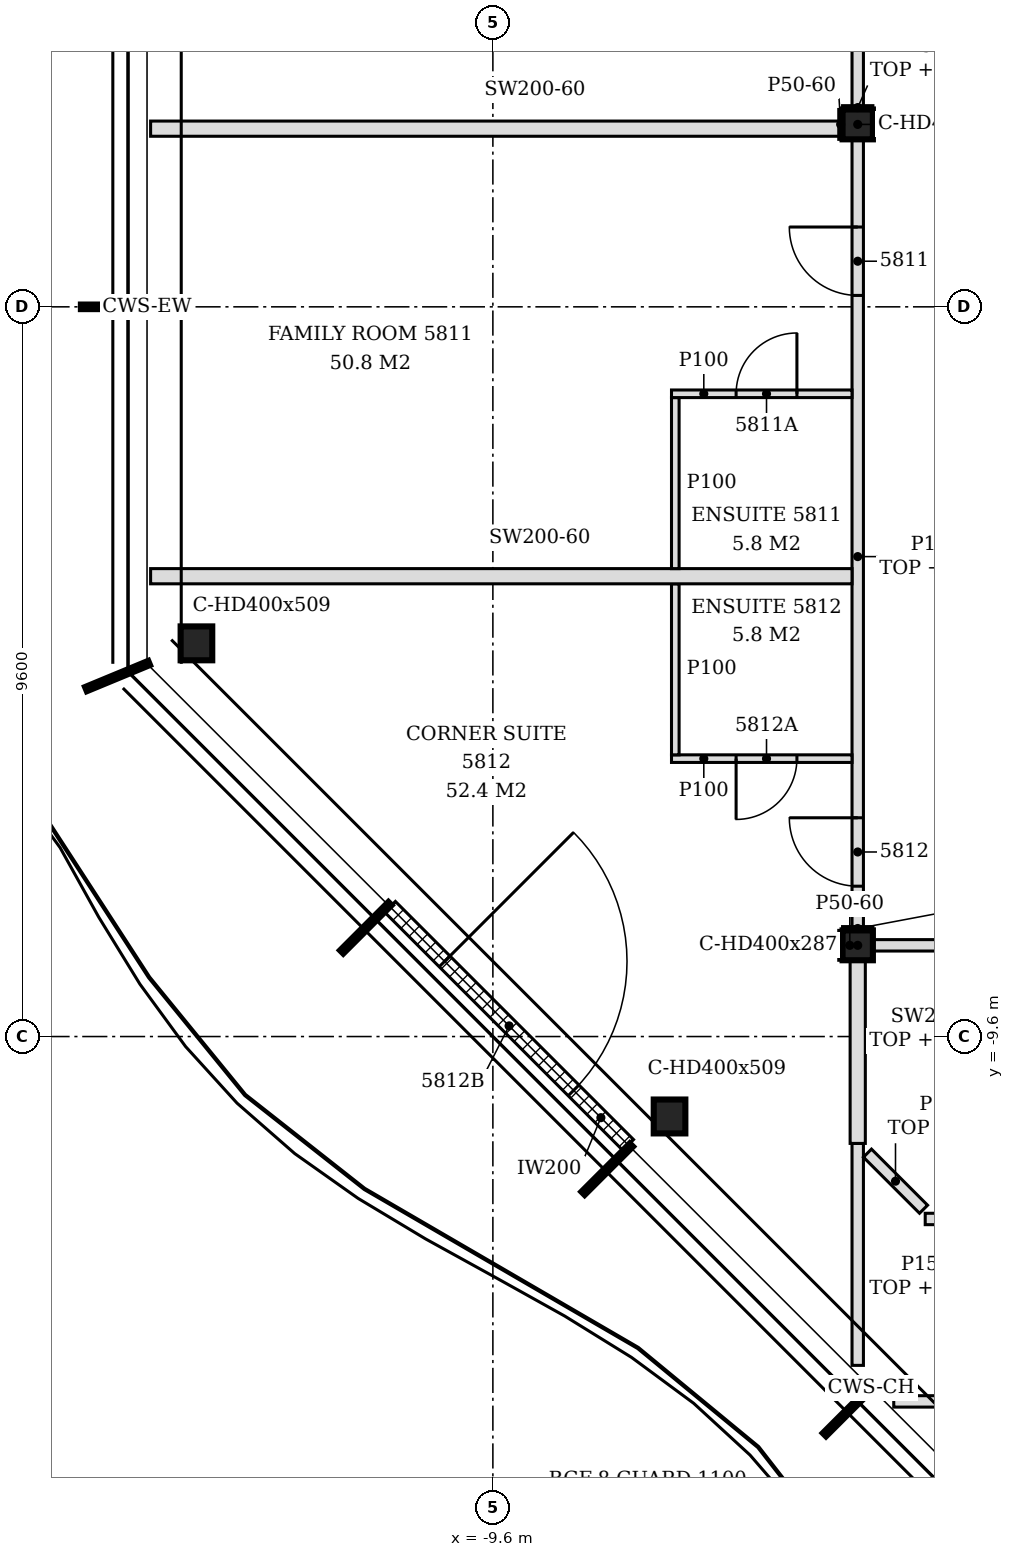
"""IFC4 building model, lengths in metres.
Left out: names, types, materials, properties, quantities, classifications, styles, units other than length and angle.
Written with IfcOpenShell. Run it as: python <this file> out.ifc"""

import sys

from ifc_helpers import new_model, si_unit, direction, frame, frame_2d, origin, origin_2d, place, context, subcontext, project, spatial, polyline, rectangle, i_section, outline, extrude, element, fill, save


model = new_model("IFC4")
c1 = context("Model", 3, precision=1e-05, world=origin(), true_north=direction((0.0, 1.0)))
c2 = subcontext(c1, "Body", "Model", "MODEL_VIEW")
j1 = project(units=[si_unit("LENGTHUNIT", "METRE"), si_unit("PLANEANGLEUNIT", "RADIAN")], contexts=[c1])
p1 = place(None, origin())
s1 = spatial("IfcSite", under=j1, at=p1, CompositionType="ELEMENT")
p2 = place(p1, origin())
s2 = spatial("IfcBuilding", under=s1, at=p2, CompositionType="ELEMENT")
p3 = place(p2, frame((0.0, 0.0, 228.6)))
s3 = spatial("IfcBuildingStorey", under=s2, at=p3, CompositionType="ELEMENT", Elevation=228.6)
for number, where, z_axis, x_axis in (
    (1, (-13.5, -4.427, -0.15), (0.0, 0.0, 1.0), (1.0, 0.0, 0.0)),
    (2, (-7.276, -10.652, -0.15), (0.0, 0.0, 1.0), (1.0, 0.0, 0.0)),
):
    element("IfcColumn", number, at=place(p3, frame(where, z_axis=z_axis, x_axis=x_axis)), inside=s3, PredefinedType="COLUMN", context=c2, shape_type="SweptSolid", body=[
        extrude(i_section(OverallWidth=0.416, OverallDepth=0.446, WebThickness=0.039, FlangeThickness=0.063, FilletRadius=0.015, at=origin_2d()), origin(), (0.0, 0.0, 1.0), 3.6),
    ])
for number, where, z_axis, x_axis in (
    (3, (-4.8, -8.4, -0.15), (0.0, 0.0, 1.0), (1.0, 0.0, 0.0)),
    (4, (-4.8, 2.4, -0.15), (0.0, 0.0, 1.0), (1.0, 0.0, 0.0)),
):
    element("IfcColumn", number, at=place(p3, frame(where, z_axis=z_axis, x_axis=x_axis)), inside=s3, PredefinedType="COLUMN", context=c2, shape_type="SweptSolid", body=[
        extrude(i_section(OverallWidth=0.399, OverallDepth=0.393, WebThickness=0.023, FlangeThickness=0.037, FilletRadius=0.015, at=origin_2d()), origin(), (0.0, 0.0, 1.0), 3.6),
    ])
p4 = place(p3, frame((-10.953, -7.893, 0.0), z_axis=(0.0, 0.0, 1.0), x_axis=(0.707106781187, -0.707106781187, 0.0)))
e5 = element("IfcWall", 5, at=p4, inside=s3, PredefinedType="NOTDEFINED", context=c2, shape_type="SweptSolid", body=[
    extrude(rectangle(XDim=4.431, YDim=0.2, at=frame_2d((2.215, 0.0))), origin(), (0.0, 0.0, 1.0), 3.45),
])
p5 = place(p4, frame((1.015, 0.0, 0.0)))
e6 = element("IfcOpeningElement", 6, at=p5, cuts=e5, PredefinedType="OPENING", context=c2, shape_type="SweptSolid", body=[
    extrude(rectangle(XDim=2.4, YDim=2.4, at=frame_2d((1.2, 1.2))), frame((0.0, 0.11, 0.0), z_axis=(0.0, -1.0, 0.0), x_axis=(1.0, 0.0, 0.0)), (0.0, 0.0, 1.0), 0.22),
])
p6 = place(p3, frame((-4.326, -14.4, 0.0), z_axis=(0.0, 0.0, 1.0), x_axis=(1.0, 0.0, 0.0)))
e7 = element("IfcWall", 7, at=p6, inside=s3, PredefinedType="PARTITIONING", context=c2, shape_type="SweptSolid", body=[
    extrude(outline(polyline([(0.0, 0.0), (21.026, 0.0), (21.026, 2.88), (11.676, 2.88), (11.674, 2.73), (11.376, 2.73), (11.374, 2.88), (1.369, 2.88), (1.367, 2.63), (0.229, 2.63), (0.227, 2.88), (0.0, 2.88), (0.0, 0.0)])), frame((0.0, 0.075, 0.0), z_axis=(0.0, -1.0, 0.0), x_axis=(1.0, 0.0, 0.0)), (0.0, 0.0, 1.0), 0.15),
])
p7 = place(p6, frame((5.169, 0.0, 0.0)))
e8 = element("IfcOpeningElement", 8, at=p7, cuts=e7, PredefinedType="OPENING", context=c2, shape_type="SweptSolid", body=[
    extrude(rectangle(XDim=0.9, YDim=2.1, at=frame_2d((0.45, 1.05))), frame((0.0, 0.085, 0.0), z_axis=(0.0, -1.0, 0.0), x_axis=(1.0, 0.0, 0.0)), (0.0, 0.0, 1.0), 0.17),
])
p8 = place(p6, frame((15.969, 0.0, 0.0)))
e9 = element("IfcOpeningElement", 9, at=p8, cuts=e7, PredefinedType="OPENING", context=c2, shape_type="SweptSolid", body=[
    extrude(rectangle(XDim=0.9, YDim=2.1, at=frame_2d((0.45, 1.05))), frame((0.0, 0.085, 0.0), z_axis=(0.0, -1.0, 0.0), x_axis=(1.0, 0.0, 0.0)), (0.0, 0.0, 1.0), 0.17),
])
p9 = place(p3, frame((-4.8, -13.926, 0.0), z_axis=(0.0, 0.0, 1.0), x_axis=(0.0, 1.0, 0.0)))
e10 = element("IfcWall", 10, at=p9, inside=s3, PredefinedType="PARTITIONING", context=c2, shape_type="SweptSolid", body=[
    extrude(outline(polyline([(0.0, 0.0), (2.92, 0.0), (2.92, 3.03), (1.369, 3.03), (1.367, 2.63), (0.229, 2.63), (0.227, 3.03), (0.0, 3.03), (0.0, 0.0)])), frame((0.0, 0.075, 0.0), z_axis=(0.0, -1.0, 0.0), x_axis=(1.0, 0.0, 0.0)), (0.0, 0.0, 1.0), 0.15),
])
p10 = place(p3, frame((-3.912, -12.0, 0.0), z_axis=(0.0, 0.0, 1.0), x_axis=(1.0, 0.0, 0.0)))
e11 = element("IfcWall", 11, at=p10, inside=s3, PredefinedType="PARTITIONING", context=c2, shape_type="SweptSolid", body=[
    extrude(rectangle(XDim=8.787, YDim=0.15, at=frame_2d((4.394, 0.0))), origin(), (0.0, 0.0, 1.0), 3.45),
])
p11 = place(p3, frame((-3.934, -11.872, 0.0), z_axis=(0.0, 0.0, 1.0), x_axis=(-0.707106781187, 0.707106781187, 0.0)))
e12 = element("IfcWall", 12, at=p11, inside=s3, PredefinedType="PARTITIONING", context=c2, shape_type="SweptSolid", body=[
    extrude(rectangle(XDim=1.044, YDim=0.15, at=frame_2d((0.522, 0.0))), origin(), (0.0, 0.0, 1.0), 3.03),
])
p12 = place(p3, frame((-4.8, -11.006, 0.0), z_axis=(0.0, 0.0, 1.0), x_axis=(0.0, 1.0, 0.0)))
e13 = element("IfcWall", 13, at=p12, inside=s3, PredefinedType="PARTITIONING", context=c2, shape_type="SweptSolid", body=[
    extrude(rectangle(XDim=2.41, YDim=0.2, at=frame_2d((1.205, 0.0))), origin(), (0.0, 0.0, 1.0), 3.03),
])
p13 = place(p3, frame((-4.601, -8.4, 0.0), z_axis=(0.0, 0.0, 1.0), x_axis=(1.0, 0.0, 0.0)))
e14 = element("IfcWall", 14, at=p13, inside=s3, PredefinedType="PARTITIONING", context=c2, shape_type="SweptSolid", body=[
    extrude(rectangle(XDim=9.476, YDim=0.15, at=frame_2d((4.738, 0.0))), origin(), (0.0, 0.0, 1.0), 2.83),
])
p14 = place(p13, frame((4.15, 0.0, 0.0)))
e15 = element("IfcOpeningElement", 15, at=p14, cuts=e14, PredefinedType="OPENING", context=c2, shape_type="SweptSolid", body=[
    extrude(rectangle(XDim=0.9, YDim=2.1, at=frame_2d((0.45, 1.05))), frame((0.0, 0.085, 0.0), z_axis=(0.0, -1.0, 0.0), x_axis=(1.0, 0.0, 0.0)), (0.0, 0.0, 1.0), 0.17),
])
p15 = place(p3, frame((-4.8, -8.204, 0.0), z_axis=(0.0, 0.0, 1.0), x_axis=(0.0, 1.0, 0.0)))
e16 = element("IfcWall", 16, at=p15, inside=s3, PredefinedType="PARTITIONING", context=c2, shape_type="SweptSolid", body=[
    extrude(rectangle(XDim=10.407, YDim=0.15, at=frame_2d((5.204, 0.0))), origin(), (0.0, 0.0, 1.0), 2.83),
])
p16 = place(p15, frame((8.354, 0.0, 0.0)))
e17 = element("IfcOpeningElement", 17, at=p16, cuts=e16, PredefinedType="OPENING", context=c2, shape_type="SweptSolid", body=[
    extrude(rectangle(XDim=0.9, YDim=2.1, at=frame_2d((0.45, 1.05))), frame((0.0, 0.085, 0.0), z_axis=(0.0, -1.0, 0.0), x_axis=(1.0, 0.0, 0.0)), (0.0, 0.0, 1.0), 0.17),
])
p17 = place(p15, frame((0.582, 0.0, 0.0)))
e18 = element("IfcOpeningElement", 18, at=p17, cuts=e16, PredefinedType="OPENING", context=c2, shape_type="SweptSolid", body=[
    extrude(rectangle(XDim=0.9, YDim=2.1, at=frame_2d((0.45, 1.05))), frame((0.0, 0.085, 0.0), z_axis=(0.0, -1.0, 0.0), x_axis=(1.0, 0.0, 0.0)), (0.0, 0.0, 1.0), 0.17),
])
p18 = place(p3, frame((-7.25, -5.944, 0.0), z_axis=(0.0, 0.0, 1.0), x_axis=(1.0, 0.0, 0.0)))
e19 = element("IfcWall", 19, at=p18, inside=s3, PredefinedType="PARTITIONING", context=c2, shape_type="SweptSolid", body=[
    extrude(outline(polyline([(0.0, 0.0), (2.375, 0.0), (2.375, 2.83), (2.3, 2.83), (2.298, 3.45), (0.0, 3.45), (0.0, 0.0)])), frame((0.0, 0.05, 0.0), z_axis=(0.0, -1.0, 0.0), x_axis=(1.0, 0.0, 0.0)), (0.0, 0.0, 1.0), 0.1),
])
p19 = place(p18, frame((0.85, 0.0, 0.0)))
e20 = element("IfcOpeningElement", 20, at=p19, cuts=e19, PredefinedType="OPENING", context=c2, shape_type="SweptSolid", body=[
    extrude(rectangle(XDim=0.8, YDim=2.1, at=frame_2d((0.4, 1.05))), frame((0.0, 0.06, 0.0), z_axis=(0.0, -1.0, 0.0), x_axis=(1.0, 0.0, 0.0)), (0.0, 0.0, 1.0), 0.12),
])
p20 = place(p3, frame((-7.2, -5.894, 0.0), z_axis=(0.0, 0.0, 1.0), x_axis=(0.0, 1.0, 0.0)))
e21 = element("IfcWall", 21, at=p20, inside=s3, PredefinedType="PARTITIONING", context=c2, shape_type="SweptSolid", body=[
    extrude(outline(polyline([(0.0, 0.0), (2.25, 0.0), (2.25, 3.45), (1.189, 3.45), (1.187, 2.98), (0.999, 2.98), (0.997, 3.45), (0.0, 3.45), (0.0, 0.0)])), frame((0.0, 0.05, 0.0), z_axis=(0.0, -1.0, 0.0), x_axis=(1.0, 0.0, 0.0)), (0.0, 0.0, 1.0), 0.1),
])
p21 = place(p3, frame((-14.103, -3.544, 0.0), z_axis=(0.0, 0.0, 1.0), x_axis=(1.0, 0.0, 0.0)))
e22 = element("IfcWall", 22, at=p21, inside=s3, PredefinedType="PARTITIONING", context=c2, shape_type="SweptSolid", body=[
    extrude(outline(polyline([(0.0, 0.0), (9.228, 0.0), (9.228, 2.83), (9.153, 2.83), (9.151, 3.45), (0.753, 3.45), (0.751, 2.93), (0.453, 2.93), (0.451, 3.45), (0.0, 3.45), (0.0, 0.0)])), frame((0.0, 0.1, 0.0), z_axis=(0.0, -1.0, 0.0), x_axis=(1.0, 0.0, 0.0)), (0.0, 0.0, 1.0), 0.2),
])
p22 = place(p3, frame((-7.2, -3.444, 0.0), z_axis=(0.0, 0.0, 1.0), x_axis=(0.0, 1.0, 0.0)))
e23 = element("IfcWall", 23, at=p22, inside=s3, PredefinedType="PARTITIONING", context=c2, shape_type="SweptSolid", body=[
    extrude(rectangle(XDim=2.25, YDim=0.1, at=frame_2d((1.125, 0.0))), origin(), (0.0, 0.0, 1.0), 3.45),
])
p23 = place(p3, frame((-7.25, -1.144, 0.0), z_axis=(0.0, 0.0, 1.0), x_axis=(1.0, 0.0, 0.0)))
e24 = element("IfcWall", 24, at=p23, inside=s3, PredefinedType="PARTITIONING", context=c2, shape_type="SweptSolid", body=[
    extrude(outline(polyline([(0.0, 0.0), (2.375, 0.0), (2.375, 2.83), (2.3, 2.83), (2.298, 3.45), (0.0, 3.45), (0.0, 0.0)])), frame((0.0, 0.05, 0.0), z_axis=(0.0, -1.0, 0.0), x_axis=(1.0, 0.0, 0.0)), (0.0, 0.0, 1.0), 0.1),
])
p24 = place(p23, frame((0.85, 0.0, 0.0)))
e25 = element("IfcOpeningElement", 25, at=p24, cuts=e24, PredefinedType="OPENING", context=c2, shape_type="SweptSolid", body=[
    extrude(rectangle(XDim=0.8, YDim=2.1, at=frame_2d((0.4, 1.05))), frame((0.0, 0.06, 0.0), z_axis=(0.0, -1.0, 0.0), x_axis=(1.0, 0.0, 0.0)), (0.0, 0.0, 1.0), 0.12),
])
p25 = place(p3, frame((-14.103, 2.344, 0.0), z_axis=(0.0, 0.0, 1.0), x_axis=(1.0, 0.0, 0.0)))
e26 = element("IfcWall", 26, at=p25, inside=s3, PredefinedType="PARTITIONING", context=c2, shape_type="SweptSolid", body=[
    extrude(outline(polyline([(0.0, 0.0), (9.104, 0.0), (9.104, 3.45), (0.753, 3.45), (0.751, 2.93), (0.453, 2.93), (0.451, 3.45), (0.0, 3.45), (0.0, 0.0)])), frame((0.0, 0.1, 0.0), z_axis=(0.0, -1.0, 0.0), x_axis=(1.0, 0.0, 0.0)), (0.0, 0.0, 1.0), 0.2),
])
p26 = place(p3, frame((-4.8, 2.596, 0.0), z_axis=(0.0, 0.0, 1.0), x_axis=(0.0, 1.0, 0.0)))
e27 = element("IfcWall", 27, at=p26, inside=s3, PredefinedType="PARTITIONING", context=c2, shape_type="SweptSolid", body=[
    extrude(outline(polyline([(0.0, 0.0), (10.407, 0.0), (10.407, 2.63), (9.961, 2.63), (9.959, 2.83), (0.0, 2.83), (0.0, 0.0)])), frame((0.0, 0.075, 0.0), z_axis=(0.0, -1.0, 0.0), x_axis=(1.0, 0.0, 0.0)), (0.0, 0.0, 1.0), 0.15),
])
for number, where, z_axis, x_axis in (
    (28, (-5.024, -8.596, 0.0), (0.0, 0.0, 1.0), (0.0, 1.0, 0.0)),
    (29, (-5.024, 2.204, 0.0), (0.0, 0.0, 1.0), (0.0, 1.0, 0.0)),
):
    element("IfcWall", number, at=place(p3, frame(where, z_axis=z_axis, x_axis=x_axis)), inside=s3, PredefinedType="PARTITIONING", context=c2, shape_type="SweptSolid", body=[
        extrude(rectangle(XDim=0.393, YDim=0.05, at=frame_2d((0.196, 0.0))), origin(), (0.0, 0.0, 1.0), 3.45),
    ])
for number, where, z_axis, x_axis in (
    (30, (-5.0, -8.178, 0.0), (0.0, 0.0, 1.0), (1.0, 0.0, 0.0)),
    (31, (-5.0, 2.622, 0.0), (0.0, 0.0, 1.0), (1.0, 0.0, 0.0)),
):
    element("IfcWall", number, at=place(p3, frame(where, z_axis=z_axis, x_axis=x_axis)), inside=s3, PredefinedType="PARTITIONING", context=c2, shape_type="SweptSolid", body=[
        extrude(rectangle(XDim=0.399, YDim=0.05, at=frame_2d((0.199, 0.0))), origin(), (0.0, 0.0, 1.0), 2.83),
    ])
p27 = place(p5, origin())
e32 = element("IfcDoor", 32, at=p27, inside=s3, OperationType="SINGLE_SWING_LEFT", PredefinedType="DOOR", context=c2, shape_type="SweptSolid", body=[
    extrude(rectangle(XDim=2.4, YDim=2.4, at=frame_2d((1.2, 1.2))), frame((0.0, 0.025, 0.0), z_axis=(0.0, -1.0, 0.0), x_axis=(1.0, 0.0, 0.0)), (0.0, 0.0, 1.0), 0.05),
])
fill(e6, e32)
p28 = place(p16, origin())
e33 = element("IfcDoor", 33, at=p28, inside=s3, OperationType="SINGLE_SWING_RIGHT", PredefinedType="DOOR", context=c2, shape_type="SweptSolid", body=[
    extrude(rectangle(XDim=0.9, YDim=2.1, at=frame_2d((0.45, 1.05))), frame((0.0, 0.025, 0.0), z_axis=(0.0, -1.0, 0.0), x_axis=(1.0, 0.0, 0.0)), (0.0, 0.0, 1.0), 0.05),
])
fill(e17, e33)
p29 = place(p24, origin())
e34 = element("IfcDoor", 34, at=p29, inside=s3, OperationType="SINGLE_SWING_RIGHT", PredefinedType="DOOR", context=c2, shape_type="SweptSolid", body=[
    extrude(rectangle(XDim=0.8, YDim=2.1, at=frame_2d((0.4, 1.05))), frame((0.0, 0.025, 0.0), z_axis=(0.0, -1.0, 0.0), x_axis=(1.0, 0.0, 0.0)), (0.0, 0.0, 1.0), 0.05),
])
fill(e25, e34)
p30 = place(p17, origin())
e35 = element("IfcDoor", 35, at=p30, inside=s3, OperationType="SINGLE_SWING_RIGHT", PredefinedType="DOOR", context=c2, shape_type="SweptSolid", body=[
    extrude(rectangle(XDim=0.9, YDim=2.1, at=frame_2d((0.45, 1.05))), frame((0.0, 0.025, 0.0), z_axis=(0.0, -1.0, 0.0), x_axis=(1.0, 0.0, 0.0)), (0.0, 0.0, 1.0), 0.05),
])
fill(e18, e35)
p31 = place(p19, frame((0.8, 0.0, 0.0), z_axis=(0.0, 0.0, 1.0), x_axis=(-1.0, 0.0, 0.0)))
e36 = element("IfcDoor", 36, at=p31, inside=s3, OperationType="SINGLE_SWING_RIGHT", PredefinedType="DOOR", context=c2, shape_type="SweptSolid", body=[
    extrude(rectangle(XDim=0.8, YDim=2.1, at=frame_2d((0.4, 1.05))), frame((0.0, 0.025, 0.0), z_axis=(0.0, -1.0, 0.0), x_axis=(1.0, 0.0, 0.0)), (0.0, 0.0, 1.0), 0.05),
])
fill(e20, e36)
save(model, sys.argv[1])
